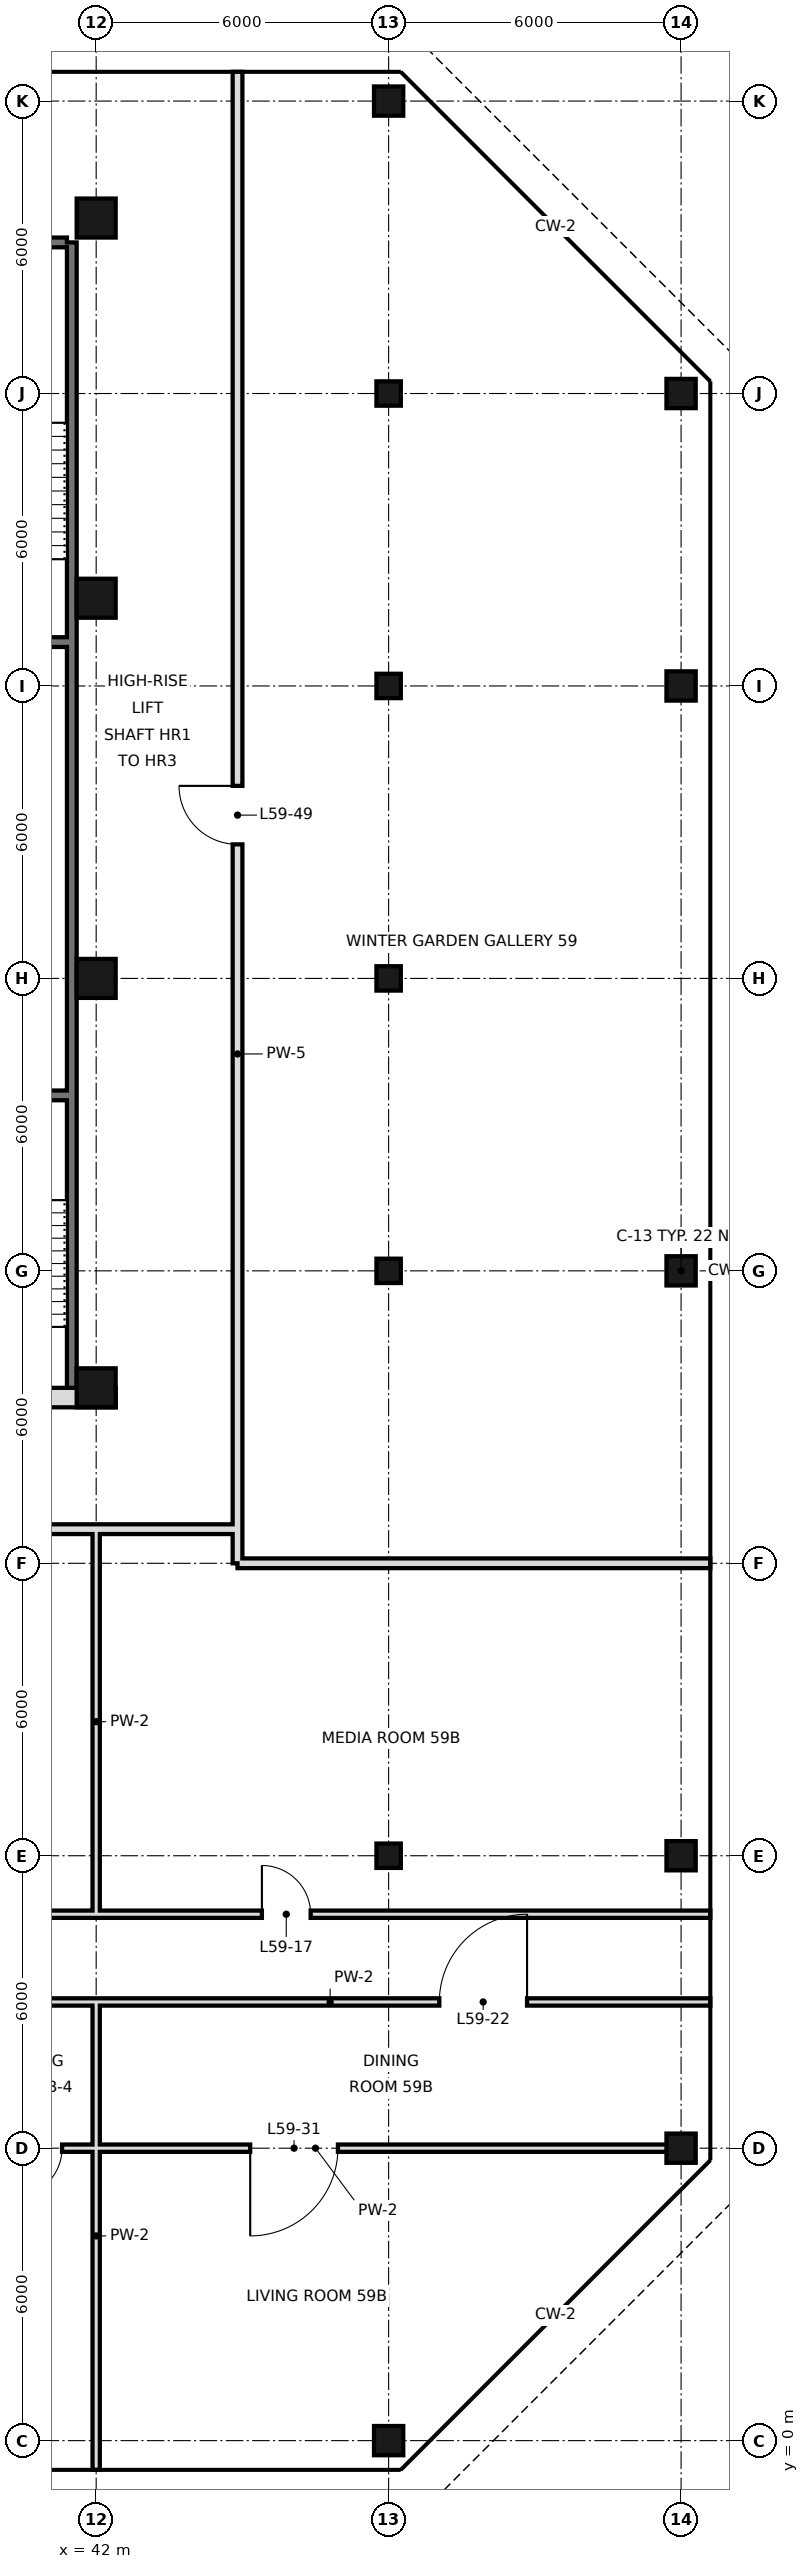
"""IFC4 building model, lengths in metres.
Left out: names, types, materials, properties, quantities, classifications, styles, units other than length and angle.
Written with IfcOpenShell. Run it as: python <this file> out.ifc"""

import sys

from ifc_helpers import new_model, si_unit, direction, frame, frame_2d, origin, origin_2d, place, context, subcontext, project, spatial, rectangle, hollow_rectangle, extrude, element, fill, save


model = new_model("IFC4")
c1 = context("Model", 3, precision=1e-05, world=origin(), true_north=direction((0.0, 1.0)))
c2 = subcontext(c1, "Body", "Model", "MODEL_VIEW")
j1 = project(units=[si_unit("LENGTHUNIT", "METRE"), si_unit("PLANEANGLEUNIT", "RADIAN")], contexts=[c1])
p1 = place(None, origin())
s1 = spatial("IfcSite", under=j1, at=p1, CompositionType="ELEMENT")
p2 = place(p1, origin())
s2 = spatial("IfcBuilding", under=s1, at=p2, CompositionType="ELEMENT")
p3 = place(p2, frame((0.0, 0.0, 250.4)))
s3 = spatial("IfcBuildingStorey", under=s2, at=p3, CompositionType="ELEMENT", Elevation=250.4)
for number, where, z_axis, x_axis in (
    (1, (42.0, 21.6, 0.0), (0.0, 0.0, 1.0), (1.0, 0.0, 0.0)),
    (2, (42.0, 30.0, 0.0), (0.0, 0.0, 1.0), (1.0, 0.0, 0.0)),
    (3, (42.0, 37.8, 0.0), (0.0, 0.0, 1.0), (1.0, 0.0, 0.0)),
    (4, (42.0, 45.6, 0.0), (0.0, 0.0, 1.0), (1.0, 0.0, 0.0)),
):
    element("IfcColumn", number, at=place(p3, frame(where, z_axis=z_axis, x_axis=x_axis)), inside=s3, PredefinedType="COLUMN", context=c2, shape_type="SweptSolid", body=[
        extrude(hollow_rectangle(XDim=0.8, YDim=0.8, WallThickness=0.032, at=origin_2d()), origin(), (0.0, 0.0, 1.0), 3.6),
    ])
p4 = place(p3, frame((48.0, 0.0, 0.0), z_axis=(0.0, 0.0, 1.0), x_axis=(1.0, 0.0, 0.0)))
e5 = element("IfcColumn", 5, at=p4, inside=s3, PredefinedType="COLUMN", context=c2, shape_type="SweptSolid", body=[
    extrude(hollow_rectangle(XDim=0.6, YDim=0.6, WallThickness=0.028, at=origin_2d()), origin(), (0.0, 0.0, 1.0), 3.6),
])
for number, where, z_axis, x_axis in (
    (6, (48.0, 12.0, 0.0), (0.0, 0.0, 1.0), (1.0, 0.0, 0.0)),
    (7, (48.0, 24.0, 0.0), (0.0, 0.0, 1.0), (1.0, 0.0, 0.0)),
    (8, (48.0, 30.0, 0.0), (0.0, 0.0, 1.0), (1.0, 0.0, 0.0)),
    (9, (48.0, 36.0, 0.0), (0.0, 0.0, 1.0), (1.0, 0.0, 0.0)),
    (10, (48.0, 42.0, 0.0), (0.0, 0.0, 1.0), (1.0, 0.0, 0.0)),
):
    element("IfcColumn", number, at=place(p3, frame(where, z_axis=z_axis, x_axis=x_axis)), inside=s3, PredefinedType="COLUMN", context=c2, shape_type="SweptSolid", body=[
        extrude(hollow_rectangle(XDim=0.5, YDim=0.5, WallThickness=0.025, at=origin_2d()), origin(), (0.0, 0.0, 1.0), 3.6),
    ])
for number, where, z_axis, x_axis in (
    (11, (48.0, 48.0, 0.0), (0.0, 0.0, 1.0), (1.0, 0.0, 0.0)),
    (12, (54.0, 6.0, 0.0), (0.0, 0.0, 1.0), (1.0, 0.0, 0.0)),
    (13, (54.0, 12.0, 0.0), (0.0, 0.0, 1.0), (1.0, 0.0, 0.0)),
    (14, (54.0, 24.0, 0.0), (0.0, 0.0, 1.0), (1.0, 0.0, 0.0)),
    (15, (54.0, 36.0, 0.0), (0.0, 0.0, 1.0), (1.0, 0.0, 0.0)),
    (16, (54.0, 42.0, 0.0), (0.0, 0.0, 1.0), (1.0, 0.0, 0.0)),
):
    element("IfcColumn", number, at=place(p3, frame(where, z_axis=z_axis, x_axis=x_axis)), inside=s3, PredefinedType="COLUMN", context=c2, shape_type="SweptSolid", body=[
        extrude(hollow_rectangle(XDim=0.6, YDim=0.6, WallThickness=0.028, at=origin_2d()), origin(), (0.0, 0.0, 1.0), 3.6),
    ])
p5 = place(p3, frame((42.0, -0.6, 0.0), z_axis=(0.0, 0.0, 1.0), x_axis=(0.0, 1.0, 0.0)))
e17 = element("IfcWall", 17, at=p5, inside=s3, PredefinedType="PARTITIONING", context=c2, shape_type="SweptSolid", body=[
    extrude(rectangle(XDim=9.6, YDim=0.15, at=frame_2d((4.8, 0.0))), origin(), (0.0, 0.0, 1.0), 2.72),
])
p6 = place(p3, frame((42.0, 10.8, 0.0), z_axis=(0.0, 0.0, 1.0), x_axis=(0.0, 1.0, 0.0)))
e18 = element("IfcWall", 18, at=p6, inside=s3, PredefinedType="PARTITIONING", context=c2, shape_type="SweptSolid", body=[
    extrude(rectangle(XDim=7.9, YDim=0.15, at=frame_2d((3.95, 0.0))), origin(), (0.0, 0.0, 1.0), 2.72),
])
p7 = place(p3, frame((44.9, 18.0, 0.0), z_axis=(0.0, 0.0, 1.0), x_axis=(0.0, 1.0, 0.0)))
e19 = element("IfcWall", 19, at=p7, inside=s3, PredefinedType="SOLIDWALL", context=c2, shape_type="SweptSolid", body=[
    extrude(rectangle(XDim=30.6, YDim=0.2, at=frame_2d((15.3, 0.0))), origin(), (0.0, 0.0, 1.0), 2.72),
])
p8 = place(p7, frame((14.75, 0.0, 0.0)))
e20 = element("IfcOpeningElement", 20, at=p8, cuts=e19, PredefinedType="OPENING", context=c2, shape_type="SweptSolid", body=[
    extrude(rectangle(XDim=1.2, YDim=2.4, at=frame_2d((0.6, 1.2))), frame((0.0, 0.11, 0.0), z_axis=(0.0, -1.0, 0.0), x_axis=(1.0, 0.0, 0.0)), (0.0, 0.0, 1.0), 0.22),
])
p9 = place(p3, frame((25.8, 10.8, 0.0), z_axis=(0.0, 0.0, 1.0), x_axis=(1.0, 0.0, 0.0)))
e21 = element("IfcWall", 21, at=p9, inside=s3, PredefinedType="PARTITIONING", context=c2, shape_type="SweptSolid", body=[
    extrude(rectangle(XDim=28.8, YDim=0.15, at=frame_2d((14.4, 0.0))), origin(), (0.0, 0.0, 1.0), 3.42),
])
p10 = place(p9, frame((11.8, 0.0, 0.0)))
e22 = element("IfcOpeningElement", 22, at=p10, cuts=e21, PredefinedType="OPENING", context=c2, shape_type="SweptSolid", body=[
    extrude(rectangle(XDim=1.0, YDim=2.4, at=frame_2d((0.5, 1.2))), frame((0.0, 0.085, 0.0), z_axis=(0.0, -1.0, 0.0), x_axis=(1.0, 0.0, 0.0)), (0.0, 0.0, 1.0), 0.17),
])
p11 = place(p9, frame((2.86, 0.0, 0.0)))
e23 = element("IfcOpeningElement", 23, at=p11, cuts=e21, PredefinedType="OPENING", context=c2, shape_type="SweptSolid", body=[
    extrude(rectangle(XDim=1.0, YDim=2.4, at=frame_2d((0.5, 1.2))), frame((0.0, 0.085, 0.0), z_axis=(0.0, -1.0, 0.0), x_axis=(1.0, 0.0, 0.0)), (0.0, 0.0, 1.0), 0.17),
])
p12 = place(p9, frame((19.6, 0.0, 0.0)))
e24 = element("IfcOpeningElement", 24, at=p12, cuts=e21, PredefinedType="OPENING", context=c2, shape_type="SweptSolid", body=[
    extrude(rectangle(XDim=1.0, YDim=2.4, at=frame_2d((0.5, 1.2))), frame((0.0, 0.085, 0.0), z_axis=(0.0, -1.0, 0.0), x_axis=(1.0, 0.0, 0.0)), (0.0, 0.0, 1.0), 0.17),
])
p13 = place(p3, frame((44.9, 18.0, 0.0), z_axis=(0.0, 0.0, 1.0), x_axis=(1.0, 0.0, 0.0)))
e25 = element("IfcWall", 25, at=p13, inside=s3, PredefinedType="SOLIDWALL", context=c2, shape_type="SweptSolid", body=[
    extrude(rectangle(XDim=9.7, YDim=0.2, at=frame_2d((4.85, 0.0))), origin(), (0.0, 0.0, 1.0), 2.72),
])
p14 = place(p3, frame((23.4, 18.7, 0.0), z_axis=(0.0, 0.0, 1.0), x_axis=(1.0, 0.0, 0.0)))
e26 = element("IfcWall", 26, at=p14, inside=s3, PredefinedType="SOLIDWALL", context=c2, shape_type="SweptSolid", body=[
    extrude(rectangle(XDim=21.5, YDim=0.2, at=frame_2d((10.75, 0.0))), origin(), (0.0, 0.0, 1.0), 2.72),
])
p15 = place(p14, frame((15.86, 0.0, 0.0)))
e27 = element("IfcOpeningElement", 27, at=p15, cuts=e26, PredefinedType="OPENING", context=c2, shape_type="SweptSolid", body=[
    extrude(rectangle(XDim=1.2, YDim=2.4, at=frame_2d((0.6, 1.2))), frame((0.0, 0.11, 0.0), z_axis=(0.0, -1.0, 0.0), x_axis=(1.0, 0.0, 0.0)), (0.0, 0.0, 1.0), 0.22),
])
p16 = place(p3, frame((39.0, 6.0, 0.0), z_axis=(0.0, 0.0, 1.0), x_axis=(1.0, 0.0, 0.0)))
e28 = element("IfcWall", 28, at=p16, inside=s3, PredefinedType="PARTITIONING", context=c2, shape_type="SweptSolid", body=[
    extrude(rectangle(XDim=15.0, YDim=0.15, at=frame_2d((7.5, 0.0))), origin(), (0.0, 0.0, 1.0), 2.97),
])
p17 = place(p16, frame((1.3, 0.0, 0.0)))
e29 = element("IfcOpeningElement", 29, at=p17, cuts=e28, PredefinedType="OPENING", context=c2, shape_type="SweptSolid", body=[
    extrude(rectangle(XDim=1.0, YDim=2.4, at=frame_2d((0.5, 1.2))), frame((0.0, 0.085, 0.0), z_axis=(0.0, -1.0, 0.0), x_axis=(1.0, 0.0, 0.0)), (0.0, 0.0, 1.0), 0.17),
])
p18 = place(p16, frame((6.16, 0.0, 0.0)))
e30 = element("IfcOpeningElement", 30, at=p18, cuts=e28, PredefinedType="OPENING", context=c2, shape_type="SweptSolid", body=[
    extrude(rectangle(XDim=1.8, YDim=2.4, at=frame_2d((0.9, 1.2))), frame((0.0, 0.085, 0.0), z_axis=(0.0, -1.0, 0.0), x_axis=(1.0, 0.0, 0.0)), (0.0, 0.0, 1.0), 0.17),
])
p19 = place(p3, frame((39.0, 9.0, 0.0), z_axis=(0.0, 0.0, 1.0), x_axis=(1.0, 0.0, 0.0)))
e31 = element("IfcWall", 31, at=p19, inside=s3, PredefinedType="PARTITIONING", context=c2, shape_type="SweptSolid", body=[
    extrude(rectangle(XDim=15.6, YDim=0.15, at=frame_2d((7.8, 0.0))), origin(), (0.0, 0.0, 1.0), 3.42),
])
p20 = place(p19, frame((1.0, 0.0, 0.0)))
e32 = element("IfcOpeningElement", 32, at=p20, cuts=e31, PredefinedType="OPENING", context=c2, shape_type="SweptSolid", body=[
    extrude(rectangle(XDim=1.0, YDim=2.4, at=frame_2d((0.5, 1.2))), frame((0.0, 0.085, 0.0), z_axis=(0.0, -1.0, 0.0), x_axis=(1.0, 0.0, 0.0)), (0.0, 0.0, 1.0), 0.17),
])
p21 = place(p19, frame((10.04, 0.0, 0.0)))
e33 = element("IfcOpeningElement", 33, at=p21, cuts=e31, PredefinedType="OPENING", context=c2, shape_type="SweptSolid", body=[
    extrude(rectangle(XDim=1.8, YDim=2.4, at=frame_2d((0.9, 1.2))), frame((0.0, 0.085, 0.0), z_axis=(0.0, -1.0, 0.0), x_axis=(1.0, 0.0, 0.0)), (0.0, 0.0, 1.0), 0.17),
])
p22 = place(p3, frame((41.5, 21.6, 0.0), z_axis=(0.0, 0.0, 1.0), x_axis=(0.0, 1.0, 0.0)))
e34 = element("IfcWall", 34, at=p22, inside=s3, PredefinedType="SOLIDWALL", context=c2, shape_type="SweptSolid", body=[
    extrude(rectangle(XDim=23.5, YDim=0.2, at=frame_2d((11.75, 0.0))), origin(), (0.0, 0.0, 1.0), 3.42),
])
p23 = place(p3, frame((6.6, 45.1, 0.0), z_axis=(0.0, 0.0, 1.0), x_axis=(1.0, 0.0, 0.0)))
e35 = element("IfcWall", 35, at=p23, inside=s3, PredefinedType="SOLIDWALL", context=c2, shape_type="SweptSolid", body=[
    extrude(rectangle(XDim=34.8, YDim=0.2, at=frame_2d((17.4, 0.0))), origin(), (0.0, 0.0, 1.0), 3.42),
])
p24 = place(p3, frame((5.6, 21.4, 0.0), z_axis=(0.0, 0.0, 1.0), x_axis=(1.0, 0.0, 0.0)))
e36 = element("IfcWall", 36, at=p24, inside=s3, PredefinedType="SOLIDWALL", context=c2, shape_type="SweptSolid", body=[
    extrude(rectangle(XDim=36.8, YDim=0.4, at=frame_2d((18.4, 0.0))), origin(), (0.0, 0.0, 1.0), 3.42),
])
p25 = place(p24, frame((8.5, 0.0, 0.0)))
e37 = element("IfcOpeningElement", 37, at=p25, cuts=e36, PredefinedType="OPENING", context=c2, shape_type="SweptSolid", body=[
    extrude(rectangle(XDim=1.8, YDim=2.1, at=frame_2d((0.9, 1.05))), frame((0.0, 0.21, 0.0), z_axis=(0.0, -1.0, 0.0), x_axis=(1.0, 0.0, 0.0)), (0.0, 0.0, 1.0), 0.42),
])
p26 = place(p24, frame((17.5, 0.0, 0.0)))
e38 = element("IfcOpeningElement", 38, at=p26, cuts=e36, PredefinedType="OPENING", context=c2, shape_type="SweptSolid", body=[
    extrude(rectangle(XDim=1.8, YDim=2.1, at=frame_2d((0.9, 1.05))), frame((0.0, 0.21, 0.0), z_axis=(0.0, -1.0, 0.0), x_axis=(1.0, 0.0, 0.0)), (0.0, 0.0, 1.0), 0.42),
])
p27 = place(p24, frame((26.5, 0.0, 0.0)))
e39 = element("IfcOpeningElement", 39, at=p27, cuts=e36, PredefinedType="OPENING", context=c2, shape_type="SweptSolid", body=[
    extrude(rectangle(XDim=1.8, YDim=2.1, at=frame_2d((0.9, 1.05))), frame((0.0, 0.21, 0.0), z_axis=(0.0, -1.0, 0.0), x_axis=(1.0, 0.0, 0.0)), (0.0, 0.0, 1.0), 0.42),
])
p28 = place(p24, frame((4.5, 0.0, 0.0)))
e40 = element("IfcOpeningElement", 40, at=p28, cuts=e36, PredefinedType="OPENING", context=c2, shape_type="SweptSolid", body=[
    extrude(rectangle(XDim=1.2, YDim=2.1, at=frame_2d((0.6, 1.05))), frame((0.0, 0.21, 0.0), z_axis=(0.0, -1.0, 0.0), x_axis=(1.0, 0.0, 0.0)), (0.0, 0.0, 1.0), 0.42),
])
p29 = place(p24, frame((31.1, 0.0, 0.0)))
e41 = element("IfcOpeningElement", 41, at=p29, cuts=e36, PredefinedType="OPENING", context=c2, shape_type="SweptSolid", body=[
    extrude(rectangle(XDim=1.2, YDim=2.1, at=frame_2d((0.6, 1.05))), frame((0.0, 0.21, 0.0), z_axis=(0.0, -1.0, 0.0), x_axis=(1.0, 0.0, 0.0)), (0.0, 0.0, 1.0), 0.42),
])
p30 = place(p3, frame((36.1, 27.6, 0.0), z_axis=(0.0, 0.0, 1.0), x_axis=(1.0, 0.0, 0.0)))
e42 = element("IfcWall", 42, at=p30, inside=s3, PredefinedType="SOLIDWALL", context=c2, shape_type="SweptSolid", body=[
    extrude(rectangle(XDim=5.3, YDim=0.2, at=frame_2d((2.65, 0.0))), origin(), (0.0, 0.0, 1.0), 3.42),
])
p31 = place(p3, frame((38.7, 36.9, 0.0), z_axis=(0.0, 0.0, 1.0), x_axis=(1.0, 0.0, 0.0)))
e43 = element("IfcWall", 43, at=p31, inside=s3, PredefinedType="SOLIDWALL", context=c2, shape_type="SweptSolid", body=[
    extrude(rectangle(XDim=2.7, YDim=0.2, at=frame_2d((1.35, 0.0))), origin(), (0.0, 0.0, 1.0), 3.42),
])
p32 = place(p12, origin())
e44 = element("IfcDoor", 44, at=p32, inside=s3, OperationType="SINGLE_SWING_LEFT", PredefinedType="DOOR", context=c2, shape_type="SweptSolid", body=[
    extrude(rectangle(XDim=1.0, YDim=2.4, at=frame_2d((0.5, 1.2))), frame((0.0, 0.025, 0.0), z_axis=(0.0, -1.0, 0.0), x_axis=(1.0, 0.0, 0.0)), (0.0, 0.0, 1.0), 0.05),
])
fill(e24, e44)
p33 = place(p21, frame((1.8, 0.0, 0.0), z_axis=(0.0, 0.0, 1.0), x_axis=(-1.0, 0.0, 0.0)))
e45 = element("IfcDoor", 45, at=p33, inside=s3, OperationType="SINGLE_SWING_LEFT", PredefinedType="DOOR", context=c2, shape_type="SweptSolid", body=[
    extrude(rectangle(XDim=1.8, YDim=2.4, at=frame_2d((0.9, 1.2))), frame((0.0, 0.025, 0.0), z_axis=(0.0, -1.0, 0.0), x_axis=(1.0, 0.0, 0.0)), (0.0, 0.0, 1.0), 0.05),
])
fill(e33, e45)
p34 = place(p17, frame((1.0, 0.0, 0.0), z_axis=(0.0, 0.0, 1.0), x_axis=(-1.0, 0.0, 0.0)))
e46 = element("IfcDoor", 46, at=p34, inside=s3, OperationType="SINGLE_SWING_RIGHT", PredefinedType="DOOR", context=c2, shape_type="SweptSolid", body=[
    extrude(rectangle(XDim=1.0, YDim=2.4, at=frame_2d((0.5, 1.2))), frame((0.0, 0.025, 0.0), z_axis=(0.0, -1.0, 0.0), x_axis=(1.0, 0.0, 0.0)), (0.0, 0.0, 1.0), 0.05),
])
fill(e29, e46)
p35 = place(p18, frame((1.8, 0.0, 0.0), z_axis=(0.0, 0.0, 1.0), x_axis=(-1.0, 0.0, 0.0)))
e47 = element("IfcDoor", 47, at=p35, inside=s3, OperationType="SINGLE_SWING_RIGHT", PredefinedType="DOOR", context=c2, shape_type="SweptSolid", body=[
    extrude(rectangle(XDim=1.8, YDim=2.4, at=frame_2d((0.9, 1.2))), frame((0.0, 0.025, 0.0), z_axis=(0.0, -1.0, 0.0), x_axis=(1.0, 0.0, 0.0)), (0.0, 0.0, 1.0), 0.05),
])
fill(e30, e47)
p36 = place(p8, frame((1.2, 0.0, 0.0), z_axis=(0.0, 0.0, 1.0), x_axis=(-1.0, 0.0, 0.0)))
e48 = element("IfcDoor", 48, at=p36, inside=s3, OperationType="SINGLE_SWING_LEFT", PredefinedType="DOOR", context=c2, shape_type="SweptSolid", body=[
    extrude(rectangle(XDim=1.2, YDim=2.4, at=frame_2d((0.6, 1.2))), frame((0.0, 0.025, 0.0), z_axis=(0.0, -1.0, 0.0), x_axis=(1.0, 0.0, 0.0)), (0.0, 0.0, 1.0), 0.05),
])
fill(e20, e48)
save(model, sys.argv[1])
